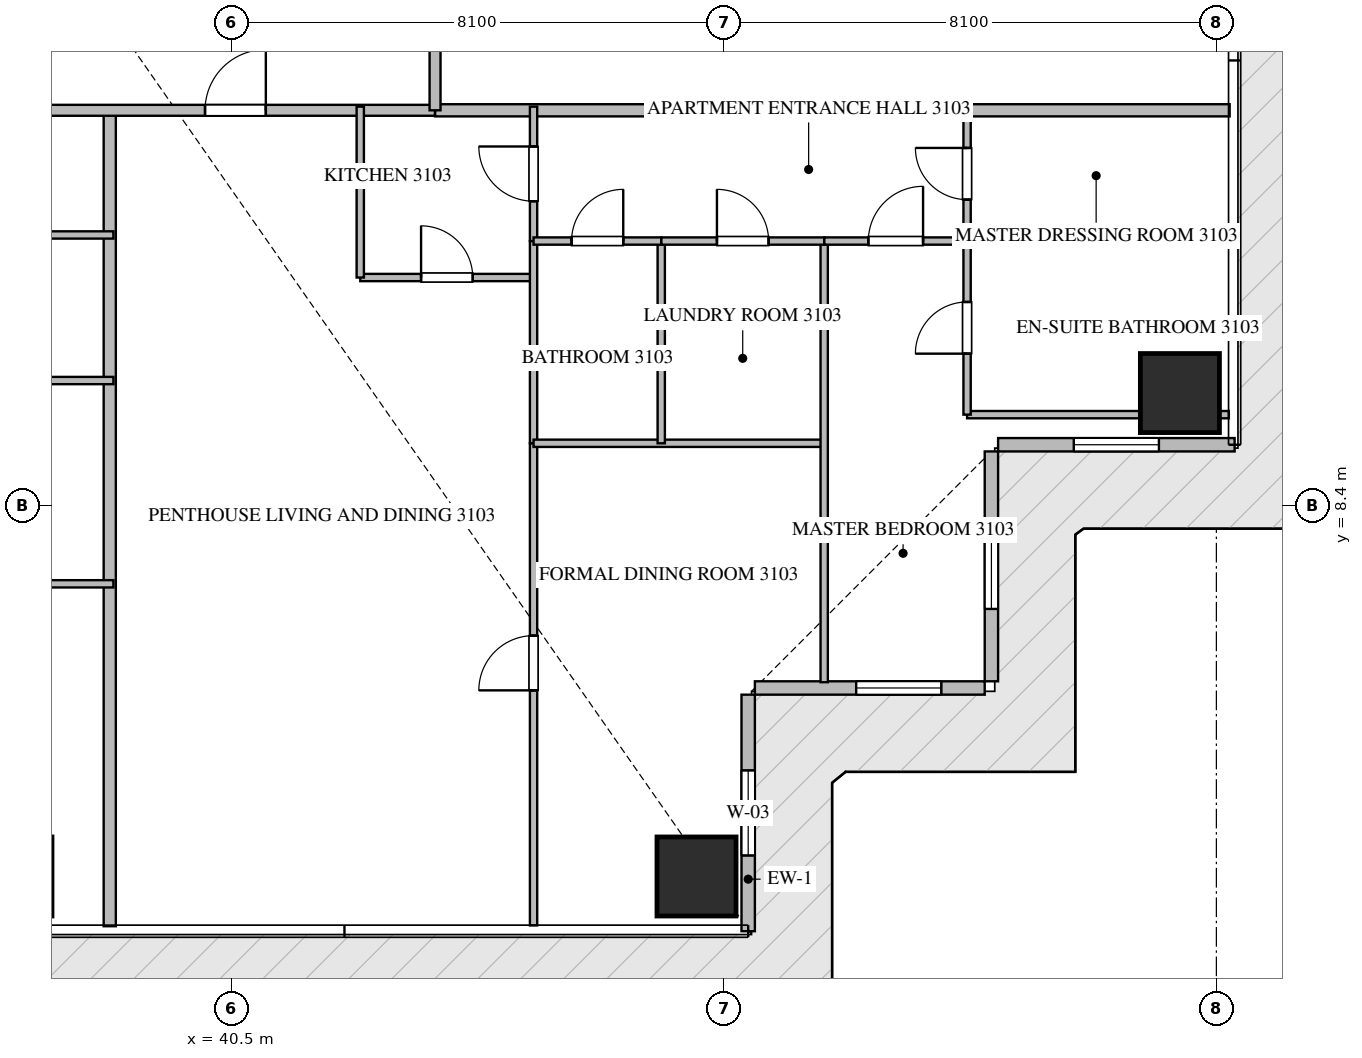
"""IFC4 building model, lengths in metres.
Left out: names, types, materials, properties, quantities, classifications, styles, units other than length and angle.
Written with IfcOpenShell. Run it as: python <this file> out.ifc"""

import sys

from ifc_helpers import new_model, si_unit, direction, frame, frame_2d, origin, origin_2d, place, context, subcontext, project, spatial, rectangle, extrude, source, transform, mapped, element, fill, save


model = new_model("IFC4")
c1 = context("Model", 3, precision=1e-05, world=origin(), true_north=direction((0.0, 1.0)))
c2 = subcontext(c1, "Body", "Model", "MODEL_VIEW")
j1 = project(units=[si_unit("LENGTHUNIT", "METRE"), si_unit("PLANEANGLEUNIT", "RADIAN")], contexts=[c1])
p1 = place(None, origin())
s1 = spatial("IfcSite", under=j1, at=p1, CompositionType="ELEMENT")
p2 = place(p1, origin())
s2 = spatial("IfcBuilding", under=s1, at=p2, CompositionType="ELEMENT")
p3 = place(p2, frame((0.0, 0.0, 127.65)))
s3 = spatial("IfcBuildingStorey", under=s2, at=p3, CompositionType="ELEMENT", Elevation=127.65)
m1 = source(origin(), c2, "Body", "SweptSolid", [
    extrude(rectangle(XDim=1.3, YDim=1.3, at=origin_2d()), origin(), (0.0, 0.0, 1.0), 3.75),
])
for number, where, z_axis, x_axis in (
    (1, (48.15, 2.3, -0.26), (0.0, 0.0, 1.0), (1.0, 0.0, 0.0)),
    (2, (56.1, 10.25, -0.26), (0.0, 0.0, 1.0), (1.0, 0.0, 0.0)),
):
    element("IfcColumn", number, at=place(p3, frame(where, z_axis=z_axis, x_axis=x_axis)), inside=s3, PredefinedType="COLUMN", context=c2, shape_type="MappedRepresentation", body=[
        mapped(m1, transform((0.0, 0.0, 0.0), scale=1.0)),
    ])
p4 = place(p3, frame((49.0, 1.4, 0.0), z_axis=(0.0, 0.0, 1.0), x_axis=(0.0, 1.0, 0.0)))
e3 = element("IfcWall", 3, at=p4, inside=s3, PredefinedType="ELEMENTEDWALL", context=c2, shape_type="SweptSolid", body=[
    extrude(rectangle(XDim=3.89, YDim=0.22, at=frame_2d((1.945, 0.0))), origin(), (0.0, 0.0, 1.0), 3.475),
])
p5 = place(p4, frame((1.245, 0.0, 0.65)))
e4 = element("IfcOpeningElement", 4, at=p5, cuts=e3, PredefinedType="OPENING", context=c2, shape_type="SweptSolid", body=[
    extrude(rectangle(XDim=1.4, YDim=2.05, at=frame_2d((0.7, 1.025))), frame((0.0, 0.12, 0.0), z_axis=(0.0, -1.0, 0.0), x_axis=(1.0, 0.0, 0.0)), (0.0, 0.0, 1.0), 0.24),
])
p6 = place(p3, frame((49.11, 5.4, 0.0), z_axis=(0.0, 0.0, 1.0), x_axis=(1.0, 0.0, 0.0)))
e5 = element("IfcWall", 5, at=p6, inside=s3, PredefinedType="ELEMENTEDWALL", context=c2, shape_type="SweptSolid", body=[
    extrude(rectangle(XDim=3.78, YDim=0.22, at=frame_2d((1.89, 0.0))), origin(), (0.0, 0.0, 1.0), 3.475),
])
p7 = place(p6, frame((1.666, 0.0, 0.65)))
e6 = element("IfcOpeningElement", 6, at=p7, cuts=e5, PredefinedType="OPENING", context=c2, shape_type="SweptSolid", body=[
    extrude(rectangle(XDim=1.4, YDim=2.05, at=frame_2d((0.7, 1.025))), frame((0.0, 0.12, 0.0), z_axis=(0.0, -1.0, 0.0), x_axis=(1.0, 0.0, 0.0)), (0.0, 0.0, 1.0), 0.24),
])
p8 = place(p3, frame((53.0, 5.51, 0.0), z_axis=(0.0, 0.0, 1.0), x_axis=(0.0, 1.0, 0.0)))
e7 = element("IfcWall", 7, at=p8, inside=s3, PredefinedType="ELEMENTEDWALL", context=c2, shape_type="SweptSolid", body=[
    extrude(rectangle(XDim=3.78, YDim=0.22, at=frame_2d((1.89, 0.0))), origin(), (0.0, 0.0, 1.0), 3.475),
])
p9 = place(p8, frame((1.19, 0.0, 0.65)))
e8 = element("IfcOpeningElement", 8, at=p9, cuts=e7, PredefinedType="OPENING", context=c2, shape_type="SweptSolid", body=[
    extrude(rectangle(XDim=1.4, YDim=2.05, at=frame_2d((0.7, 1.025))), frame((0.0, 0.12, 0.0), z_axis=(0.0, -1.0, 0.0), x_axis=(1.0, 0.0, 0.0)), (0.0, 0.0, 1.0), 0.24),
])
p10 = place(p3, frame((53.11, 9.4, 0.0), z_axis=(0.0, 0.0, 1.0), x_axis=(1.0, 0.0, 0.0)))
e9 = element("IfcWall", 9, at=p10, inside=s3, PredefinedType="ELEMENTEDWALL", context=c2, shape_type="SweptSolid", body=[
    extrude(rectangle(XDim=3.89, YDim=0.22, at=frame_2d((1.945, 0.0))), origin(), (0.0, 0.0, 1.0), 3.475),
])
p11 = place(p10, frame((1.245, 0.0, 0.65)))
e10 = element("IfcOpeningElement", 10, at=p11, cuts=e9, PredefinedType="OPENING", context=c2, shape_type="SweptSolid", body=[
    extrude(rectangle(XDim=1.4, YDim=2.05, at=frame_2d((0.7, 1.025))), frame((0.0, 0.12, 0.0), z_axis=(0.0, -1.0, 0.0), x_axis=(1.0, 0.0, 0.0)), (0.0, 0.0, 1.0), 0.24),
])
p12 = place(p3, frame((38.5, 1.482, 0.0), z_axis=(0.0, 0.0, 1.0), x_axis=(0.0, 1.0, 0.0)))
e11 = element("IfcWall", 11, at=p12, inside=s3, PredefinedType="PARTITIONING", context=c2, shape_type="SweptSolid", body=[
    extrude(rectangle(XDim=13.418, YDim=0.2, at=frame_2d((6.709, 0.0))), origin(), (0.0, 0.0, 1.0), 3.49),
])
p13 = place(p3, frame((43.85, 14.9, 0.0), z_axis=(0.0, 0.0, 1.0), x_axis=(1.0, 0.0, 0.0)))
e12 = element("IfcWall", 12, at=p13, inside=s3, PredefinedType="PARTITIONING", context=c2, shape_type="SweptSolid", body=[
    extrude(rectangle(XDim=13.068, YDim=0.2, at=frame_2d((6.534, 0.0))), origin(), (0.0, 0.0, 1.0), 3.49),
])
p14 = place(p3, frame((20.952, 14.9, 0.0), z_axis=(0.0, 0.0, 1.0), x_axis=(1.0, 0.0, 0.0)))
e13 = element("IfcWall", 13, at=p14, inside=s3, PredefinedType="PARTITIONING", context=c2, shape_type="SweptSolid", body=[
    extrude(rectangle(XDim=22.896, YDim=0.18, at=frame_2d((11.448, 0.0))), origin(), (0.0, 0.0, 1.0), 3.49),
])
p15 = place(p14, frame((2.781, 0.0, 0.0)))
e14 = element("IfcOpeningElement", 14, at=p15, cuts=e13, PredefinedType="OPENING", context=c2, shape_type="SweptSolid", body=[
    extrude(rectangle(XDim=1.0, YDim=2.15, at=frame_2d((0.5, 1.075))), frame((0.0, 0.1, 0.0), z_axis=(0.0, -1.0, 0.0), x_axis=(1.0, 0.0, 0.0)), (0.0, 0.0, 1.0), 0.2),
])
p16 = place(p14, frame((7.16, 0.0, 0.0)))
e15 = element("IfcOpeningElement", 15, at=p16, cuts=e13, PredefinedType="OPENING", context=c2, shape_type="SweptSolid", body=[
    extrude(rectangle(XDim=1.0, YDim=2.15, at=frame_2d((0.5, 1.075))), frame((0.0, 0.1, 0.0), z_axis=(0.0, -1.0, 0.0), x_axis=(1.0, 0.0, 0.0)), (0.0, 0.0, 1.0), 0.2),
])
p17 = place(p14, frame((19.115, 0.0, 0.0)))
e16 = element("IfcOpeningElement", 16, at=p17, cuts=e13, PredefinedType="OPENING", context=c2, shape_type="SweptSolid", body=[
    extrude(rectangle(XDim=1.0, YDim=2.15, at=frame_2d((0.5, 1.075))), frame((0.0, 0.1, 0.0), z_axis=(0.0, -1.0, 0.0), x_axis=(1.0, 0.0, 0.0)), (0.0, 0.0, 1.0), 0.2),
])
p18 = place(p3, frame((43.85, 14.9, 0.0), z_axis=(0.0, 0.0, 1.0), x_axis=(0.0, 1.0, 0.0)))
e17 = element("IfcWall", 17, at=p18, inside=s3, PredefinedType="PARTITIONING", context=c2, shape_type="SweptSolid", body=[
    extrude(rectangle(XDim=18.7, YDim=0.18, at=frame_2d((9.35, 0.0))), origin(), (0.0, 0.0, 1.0), 3.49),
])
p19 = place(p18, frame((1.805, 0.0, 0.0)))
e18 = element("IfcOpeningElement", 18, at=p19, cuts=e17, PredefinedType="OPENING", context=c2, shape_type="SweptSolid", body=[
    extrude(rectangle(XDim=1.0, YDim=2.15, at=frame_2d((0.5, 1.075))), frame((0.0, 0.1, 0.0), z_axis=(0.0, -1.0, 0.0), x_axis=(1.0, 0.0, 0.0)), (0.0, 0.0, 1.0), 0.2),
])
p20 = place(p18, frame((10.602, 0.0, 0.0)))
e19 = element("IfcOpeningElement", 19, at=p20, cuts=e17, PredefinedType="OPENING", context=c2, shape_type="SweptSolid", body=[
    extrude(rectangle(XDim=1.0, YDim=2.15, at=frame_2d((0.5, 1.075))), frame((0.0, 0.1, 0.0), z_axis=(0.0, -1.0, 0.0), x_axis=(1.0, 0.0, 0.0)), (0.0, 0.0, 1.0), 0.2),
])
p21 = place(p3, frame((30.94, 7.113, 0.0), z_axis=(0.0, 0.0, 1.0), x_axis=(1.0, 0.0, 0.0)))
e20 = element("IfcWall", 20, at=p21, inside=s3, PredefinedType="PARTITIONING", context=c2, shape_type="SweptSolid", body=[
    extrude(rectangle(XDim=7.62, YDim=0.12, at=frame_2d((3.81, 0.0))), origin(), (0.0, 0.0, 1.0), 3.49),
])
p22 = place(p3, frame((30.94, 10.456, 0.0), z_axis=(0.0, 0.0, 1.0), x_axis=(1.0, 0.0, 0.0)))
e21 = element("IfcWall", 21, at=p22, inside=s3, PredefinedType="PARTITIONING", context=c2, shape_type="SweptSolid", body=[
    extrude(rectangle(XDim=7.62, YDim=0.12, at=frame_2d((3.81, 0.0))), origin(), (0.0, 0.0, 1.0), 2.972),
])
p23 = place(p3, frame((30.94, 12.85, 0.0), z_axis=(0.0, 0.0, 1.0), x_axis=(1.0, 0.0, 0.0)))
e22 = element("IfcWall", 22, at=p23, inside=s3, PredefinedType="PARTITIONING", context=c2, shape_type="SweptSolid", body=[
    extrude(rectangle(XDim=7.62, YDim=0.12, at=frame_2d((3.81, 0.0))), origin(), (0.0, 0.0, 1.0), 3.49),
])
p24 = place(p3, frame((42.62, 12.15, 0.0), z_axis=(0.0, 0.0, 1.0), x_axis=(1.0, 0.0, 0.0)))
e23 = element("IfcWall", 23, at=p24, inside=s3, PredefinedType="PARTITIONING", context=c2, shape_type="SweptSolid", body=[
    extrude(rectangle(XDim=2.85, YDim=0.12, at=frame_2d((1.425, 0.0))), origin(), (0.0, 0.0, 1.0), 3.49),
])
p25 = place(p24, frame((1.0, 0.0, 0.0)))
e24 = element("IfcOpeningElement", 24, at=p25, cuts=e23, PredefinedType="OPENING", context=c2, shape_type="SweptSolid", body=[
    extrude(rectangle(XDim=0.85, YDim=2.1, at=frame_2d((0.425, 1.05))), frame((0.0, 0.07, 0.0), z_axis=(0.0, -1.0, 0.0), x_axis=(1.0, 0.0, 0.0)), (0.0, 0.0, 1.0), 0.14),
])
p26 = place(p3, frame((42.62, 12.15, 0.0), z_axis=(0.0, 0.0, 1.0), x_axis=(0.0, 1.0, 0.0)))
e25 = element("IfcWall", 25, at=p26, inside=s3, PredefinedType="PARTITIONING", context=c2, shape_type="SweptSolid", body=[
    extrude(rectangle(XDim=2.81, YDim=0.12, at=frame_2d((1.405, 0.0))), origin(), (0.0, 0.0, 1.0), 3.49),
])
p27 = place(p3, frame((45.47, 12.75, 0.0), z_axis=(0.0, 0.0, 1.0), x_axis=(0.0, 1.0, 0.0)))
e26 = element("IfcWall", 26, at=p27, inside=s3, PredefinedType="PARTITIONING", context=c2, shape_type="SweptSolid", body=[
    extrude(rectangle(XDim=2.21, YDim=0.12, at=frame_2d((1.105, 0.0))), origin(), (0.0, 0.0, 1.0), 3.49),
])
p28 = place(p27, frame((0.655, 0.0, 0.0)))
e27 = element("IfcOpeningElement", 27, at=p28, cuts=e26, PredefinedType="OPENING", context=c2, shape_type="SweptSolid", body=[
    extrude(rectangle(XDim=0.9, YDim=2.1, at=frame_2d((0.45, 1.05))), frame((0.0, 0.07, 0.0), z_axis=(0.0, -1.0, 0.0), x_axis=(1.0, 0.0, 0.0)), (0.0, 0.0, 1.0), 0.14),
])
p29 = place(p3, frame((45.47, 1.495, 0.0), z_axis=(0.0, 0.0, 1.0), x_axis=(0.0, 1.0, 0.0)))
e28 = element("IfcWall", 28, at=p29, inside=s3, PredefinedType="PARTITIONING", context=c2, shape_type="SweptSolid", body=[
    extrude(rectangle(XDim=7.929, YDim=0.12, at=frame_2d((3.964, 0.0))), origin(), (0.0, 0.0, 1.0), 3.49),
])
p30 = place(p29, frame((3.866, 0.0, 0.0)))
e29 = element("IfcOpeningElement", 29, at=p30, cuts=e28, PredefinedType="OPENING", context=c2, shape_type="SweptSolid", body=[
    extrude(rectangle(XDim=0.9, YDim=2.1, at=frame_2d((0.45, 1.05))), frame((0.0, 0.07, 0.0), z_axis=(0.0, -1.0, 0.0), x_axis=(1.0, 0.0, 0.0)), (0.0, 0.0, 1.0), 0.14),
])
p31 = place(p3, frame((45.47, 9.426, 0.0), z_axis=(0.0, 0.0, 1.0), x_axis=(0.0, 1.0, 0.0)))
e30 = element("IfcWall", 30, at=p31, inside=s3, PredefinedType="PARTITIONING", context=c2, shape_type="SweptSolid", body=[
    extrude(rectangle(XDim=3.322, YDim=0.12, at=frame_2d((1.661, 0.0))), origin(), (0.0, 0.0, 1.0), 3.49),
])
p32 = place(p3, frame((45.47, 9.424, 0.0), z_axis=(0.0, 0.0, 1.0), x_axis=(1.0, 0.0, 0.0)))
e31 = element("IfcWall", 31, at=p32, inside=s3, PredefinedType="PARTITIONING", context=c2, shape_type="SweptSolid", body=[
    extrude(rectangle(XDim=4.78, YDim=0.12, at=frame_2d((2.39, 0.0))), origin(), (0.0, 0.0, 1.0), 3.49),
])
p33 = place(p3, frame((50.25, 5.495, 0.0), z_axis=(0.0, 0.0, 1.0), x_axis=(0.0, 1.0, 0.0)))
e32 = element("IfcWall", 32, at=p33, inside=s3, PredefinedType="PARTITIONING", context=c2, shape_type="SweptSolid", body=[
    extrude(rectangle(XDim=7.255, YDim=0.12, at=frame_2d((3.627, 0.0))), origin(), (0.0, 0.0, 1.0), 3.49),
])
p34 = place(p3, frame((47.57, 9.424, 0.0), z_axis=(0.0, 0.0, 1.0), x_axis=(0.0, 1.0, 0.0)))
e33 = element("IfcWall", 33, at=p34, inside=s3, PredefinedType="PARTITIONING", context=c2, shape_type="SweptSolid", body=[
    extrude(rectangle(XDim=3.326, YDim=0.12, at=frame_2d((1.663, 0.0))), origin(), (0.0, 0.0, 1.0), 3.49),
])
p35 = place(p3, frame((45.47, 12.75, 0.0), z_axis=(0.0, 0.0, 1.0), x_axis=(1.0, 0.0, 0.0)))
e34 = element("IfcWall", 34, at=p35, inside=s3, PredefinedType="PARTITIONING", context=c2, shape_type="SweptSolid", body=[
    extrude(rectangle(XDim=2.1, YDim=0.12, at=frame_2d((1.05, 0.0))), origin(), (0.0, 0.0, 1.0), 3.49),
])
p36 = place(p35, frame((0.625, 0.0, 0.0)))
e35 = element("IfcOpeningElement", 35, at=p36, cuts=e34, PredefinedType="OPENING", context=c2, shape_type="SweptSolid", body=[
    extrude(rectangle(XDim=0.85, YDim=2.1, at=frame_2d((0.425, 1.05))), frame((0.0, 0.07, 0.0), z_axis=(0.0, -1.0, 0.0), x_axis=(1.0, 0.0, 0.0)), (0.0, 0.0, 1.0), 0.14),
])
p37 = place(p3, frame((47.572, 12.75, 0.0), z_axis=(0.0, 0.0, 1.0), x_axis=(1.0, 0.0, 0.0)))
e36 = element("IfcWall", 36, at=p37, inside=s3, PredefinedType="PARTITIONING", context=c2, shape_type="SweptSolid", body=[
    extrude(rectangle(XDim=2.678, YDim=0.12, at=frame_2d((1.339, 0.0))), origin(), (0.0, 0.0, 1.0), 3.49),
])
p38 = place(p37, frame((0.914, 0.0, 0.0)))
e37 = element("IfcOpeningElement", 37, at=p38, cuts=e36, PredefinedType="OPENING", context=c2, shape_type="SweptSolid", body=[
    extrude(rectangle(XDim=0.85, YDim=2.1, at=frame_2d((0.425, 1.05))), frame((0.0, 0.07, 0.0), z_axis=(0.0, -1.0, 0.0), x_axis=(1.0, 0.0, 0.0)), (0.0, 0.0, 1.0), 0.14),
])
p39 = place(p3, frame((50.252, 12.75, 0.0), z_axis=(0.0, 0.0, 1.0), x_axis=(1.0, 0.0, 0.0)))
e38 = element("IfcWall", 38, at=p39, inside=s3, PredefinedType="PARTITIONING", context=c2, shape_type="SweptSolid", body=[
    extrude(rectangle(XDim=2.348, YDim=0.12, at=frame_2d((1.174, 0.0))), origin(), (0.0, 0.0, 1.0), 3.49),
])
p40 = place(p39, frame((0.724, 0.0, 0.0)))
e39 = element("IfcOpeningElement", 39, at=p40, cuts=e38, PredefinedType="OPENING", context=c2, shape_type="SweptSolid", body=[
    extrude(rectangle(XDim=0.9, YDim=2.1, at=frame_2d((0.45, 1.05))), frame((0.0, 0.07, 0.0), z_axis=(0.0, -1.0, 0.0), x_axis=(1.0, 0.0, 0.0)), (0.0, 0.0, 1.0), 0.14),
])
p41 = place(p3, frame((52.6, 9.895, 0.0), z_axis=(0.0, 0.0, 1.0), x_axis=(1.0, 0.0, 0.0)))
e40 = element("IfcWall", 40, at=p41, inside=s3, PredefinedType="PARTITIONING", context=c2, shape_type="SweptSolid", body=[
    extrude(rectangle(XDim=4.305, YDim=0.12, at=frame_2d((2.152, 0.0))), origin(), (0.0, 0.0, 1.0), 3.49),
])
p42 = place(p3, frame((52.602, 12.75, 0.0), z_axis=(0.0, 0.0, 1.0), x_axis=(1.0, 0.0, 0.0)))
e41 = element("IfcWall", 41, at=p42, inside=s3, PredefinedType="PARTITIONING", context=c2, shape_type="SweptSolid", body=[
    extrude(rectangle(XDim=4.303, YDim=0.12, at=frame_2d((2.151, 0.0))), origin(), (0.0, 0.0, 1.0), 3.49),
])
p43 = place(p3, frame((52.6, 9.895, 0.0), z_axis=(0.0, 0.0, 1.0), x_axis=(0.0, 1.0, 0.0)))
e42 = element("IfcWall", 42, at=p43, inside=s3, PredefinedType="PARTITIONING", context=c2, shape_type="SweptSolid", body=[
    extrude(rectangle(XDim=2.855, YDim=0.12, at=frame_2d((1.427, 0.0))), origin(), (0.0, 0.0, 1.0), 3.49),
])
p44 = place(p43, frame((1.003, 0.0, 0.0)))
e43 = element("IfcOpeningElement", 43, at=p44, cuts=e42, PredefinedType="OPENING", context=c2, shape_type="SweptSolid", body=[
    extrude(rectangle(XDim=0.85, YDim=2.1, at=frame_2d((0.425, 1.05))), frame((0.0, 0.07, 0.0), z_axis=(0.0, -1.0, 0.0), x_axis=(1.0, 0.0, 0.0)), (0.0, 0.0, 1.0), 0.14),
])
p45 = place(p3, frame((52.6, 12.752, 0.0), z_axis=(0.0, 0.0, 1.0), x_axis=(0.0, 1.0, 0.0)))
e44 = element("IfcWall", 44, at=p45, inside=s3, PredefinedType="PARTITIONING", context=c2, shape_type="SweptSolid", body=[
    extrude(rectangle(XDim=2.208, YDim=0.12, at=frame_2d((1.104, 0.0))), origin(), (0.0, 0.0, 1.0), 3.49),
])
p46 = place(p45, frame((0.679, 0.0, 0.0)))
e45 = element("IfcOpeningElement", 45, at=p46, cuts=e44, PredefinedType="OPENING", context=c2, shape_type="SweptSolid", body=[
    extrude(rectangle(XDim=0.85, YDim=2.1, at=frame_2d((0.425, 1.05))), frame((0.0, 0.07, 0.0), z_axis=(0.0, -1.0, 0.0), x_axis=(1.0, 0.0, 0.0)), (0.0, 0.0, 1.0), 0.14),
])
m2 = source(origin(), c2, "Body", "SweptSolid", [
    extrude(rectangle(XDim=1.4, YDim=2.05, at=frame_2d((0.7, 1.025))), frame((0.0, 0.03, 0.0), z_axis=(0.0, -1.0, 0.0), x_axis=(1.0, 0.0, 0.0)), (0.0, 0.0, 1.0), 0.06),
])
p47 = place(p5, origin())
e46 = element("IfcWindow", 46, at=p47, inside=s3, PartitioningType="SINGLE_PANEL", PredefinedType="WINDOW", context=c2, shape_type="MappedRepresentation", body=[
    mapped(m2, transform((0.0, 0.0, 0.0), scale=1.0)),
])
fill(e4, e46)
p48 = place(p7, origin())
e47 = element("IfcWindow", 47, at=p48, inside=s3, PartitioningType="SINGLE_PANEL", PredefinedType="WINDOW", context=c2, shape_type="MappedRepresentation", body=[
    mapped(m2, transform((0.0, 0.0, 0.0), scale=1.0)),
])
fill(e6, e47)
p49 = place(p9, origin())
e48 = element("IfcWindow", 48, at=p49, inside=s3, PartitioningType="SINGLE_PANEL", PredefinedType="WINDOW", context=c2, shape_type="MappedRepresentation", body=[
    mapped(m2, transform((0.0, 0.0, 0.0), scale=1.0)),
])
fill(e8, e48)
p50 = place(p11, origin())
e49 = element("IfcWindow", 49, at=p50, inside=s3, PartitioningType="SINGLE_PANEL", PredefinedType="WINDOW", context=c2, shape_type="MappedRepresentation", body=[
    mapped(m2, transform((0.0, 0.0, 0.0), scale=1.0)),
])
fill(e10, e49)
m3 = source(origin(), c2, "Body", "SweptSolid", [
    extrude(rectangle(XDim=1.0, YDim=2.15, at=frame_2d((0.5, 1.075))), frame((0.0, 0.025, 0.0), z_axis=(0.0, -1.0, 0.0), x_axis=(1.0, 0.0, 0.0)), (0.0, 0.0, 1.0), 0.05),
])
p51 = place(p17, origin())
e50 = element("IfcDoor", 50, at=p51, inside=s3, OperationType="SINGLE_SWING_RIGHT", PredefinedType="DOOR", context=c2, shape_type="MappedRepresentation", body=[
    mapped(m3, transform((0.0, 0.0, 0.0), scale=1.0)),
])
fill(e16, e50)
m4 = source(origin(), c2, "Body", "SweptSolid", [
    extrude(rectangle(XDim=0.85, YDim=2.1, at=frame_2d((0.425, 1.05))), frame((0.0, 0.025, 0.0), z_axis=(0.0, -1.0, 0.0), x_axis=(1.0, 0.0, 0.0)), (0.0, 0.0, 1.0), 0.05),
])
p52 = place(p25, origin())
e51 = element("IfcDoor", 51, at=p52, inside=s3, OperationType="SINGLE_SWING_LEFT", PredefinedType="DOOR", context=c2, shape_type="MappedRepresentation", body=[
    mapped(m4, transform((0.0, 0.0, 0.0), scale=1.0)),
])
fill(e24, e51)
m5 = source(origin(), c2, "Body", "SweptSolid", [
    extrude(rectangle(XDim=0.9, YDim=2.1, at=frame_2d((0.45, 1.05))), frame((0.0, 0.025, 0.0), z_axis=(0.0, -1.0, 0.0), x_axis=(1.0, 0.0, 0.0)), (0.0, 0.0, 1.0), 0.05),
])
p53 = place(p28, origin())
e52 = element("IfcDoor", 52, at=p53, inside=s3, OperationType="SINGLE_SWING_RIGHT", PredefinedType="DOOR", context=c2, shape_type="MappedRepresentation", body=[
    mapped(m5, transform((0.0, 0.0, 0.0), scale=1.0)),
])
fill(e27, e52)
p54 = place(p30, origin())
e53 = element("IfcDoor", 53, at=p54, inside=s3, OperationType="SINGLE_SWING_LEFT", PredefinedType="DOOR", context=c2, shape_type="MappedRepresentation", body=[
    mapped(m5, transform((0.0, 0.0, 0.0), scale=1.0)),
])
fill(e29, e53)
p55 = place(p36, origin())
e54 = element("IfcDoor", 54, at=p55, inside=s3, OperationType="SINGLE_SWING_RIGHT", PredefinedType="DOOR", context=c2, shape_type="MappedRepresentation", body=[
    mapped(m4, transform((0.0, 0.0, 0.0), scale=1.0)),
])
fill(e35, e54)
p56 = place(p38, origin())
e55 = element("IfcDoor", 55, at=p56, inside=s3, OperationType="SINGLE_SWING_LEFT", PredefinedType="DOOR", context=c2, shape_type="MappedRepresentation", body=[
    mapped(m4, transform((0.0, 0.0, 0.0), scale=1.0)),
])
fill(e37, e55)
p57 = place(p40, origin())
e56 = element("IfcDoor", 56, at=p57, inside=s3, OperationType="SINGLE_SWING_RIGHT", PredefinedType="DOOR", context=c2, shape_type="MappedRepresentation", body=[
    mapped(m5, transform((0.0, 0.0, 0.0), scale=1.0)),
])
fill(e39, e56)
p58 = place(p44, origin())
e57 = element("IfcDoor", 57, at=p58, inside=s3, OperationType="SINGLE_SWING_LEFT", PredefinedType="DOOR", context=c2, shape_type="MappedRepresentation", body=[
    mapped(m4, transform((0.0, 0.0, 0.0), scale=1.0)),
])
fill(e43, e57)
p59 = place(p46, origin())
e58 = element("IfcDoor", 58, at=p59, inside=s3, OperationType="SINGLE_SWING_RIGHT", PredefinedType="DOOR", context=c2, shape_type="MappedRepresentation", body=[
    mapped(m4, transform((0.0, 0.0, 0.0), scale=1.0)),
])
fill(e45, e58)
save(model, sys.argv[1])
